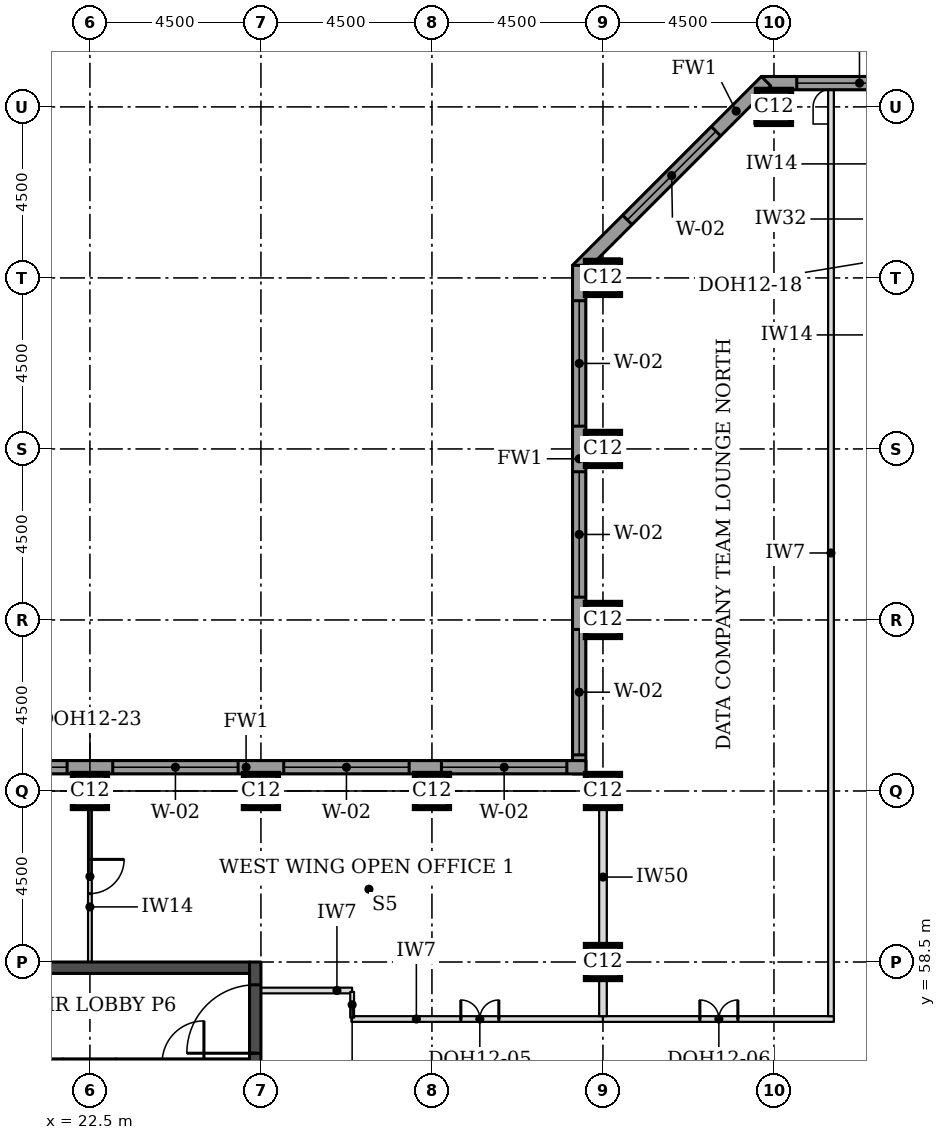
"""IFC4 building model, lengths in metres.
Left out: names, types, materials, properties, quantities, classifications, styles, units other than length and angle.
Written with IfcOpenShell. Run it as: python <this file> out.ifc"""

import sys

from ifc_helpers import new_model, si_unit, direction, frame, frame_2d, origin, origin_2d, place, context, subcontext, project, spatial, rectangle, extrude, element, fill, save


model = new_model("IFC4")
c1 = context("Model", 3, precision=1e-05, world=origin(), true_north=direction((0.0, 1.0)))
c2 = subcontext(c1, "Body", "Model", "MODEL_VIEW")
j1 = project(units=[si_unit("LENGTHUNIT", "METRE"), si_unit("PLANEANGLEUNIT", "RADIAN")], contexts=[c1])
p1 = place(None, origin())
s1 = spatial("IfcSite", under=j1, at=p1, CompositionType="ELEMENT")
p2 = place(p1, origin())
s2 = spatial("IfcBuilding", under=s1, at=p2, CompositionType="ELEMENT")
p3 = place(p2, frame((0.0, 0.0, 248.9)))
s3 = spatial("IfcBuildingStorey", under=s2, at=p3, CompositionType="ELEMENT", Elevation=248.9)
for number, where, z_axis, x_axis in (
    (1, (36.0, 58.5, 0.0), (0.0, 0.0, 1.0), (1.0, 0.0, 0.0)),
    (2, (22.5, 63.0, 0.0), (0.0, 0.0, 1.0), (1.0, 0.0, 0.0)),
    (3, (27.0, 63.0, 0.0), (0.0, 0.0, 1.0), (1.0, 0.0, 0.0)),
    (4, (31.5, 63.0, 0.0), (0.0, 0.0, 1.0), (1.0, 0.0, 0.0)),
    (5, (36.0, 63.0, 0.0), (0.0, 0.0, 1.0), (1.0, 0.0, 0.0)),
    (6, (36.0, 67.5, 0.0), (0.0, 0.0, 1.0), (1.0, 0.0, 0.0)),
    (7, (36.0, 72.0, 0.0), (0.0, 0.0, 1.0), (1.0, 0.0, 0.0)),
    (8, (36.0, 76.5, 0.0), (0.0, 0.0, 1.0), (1.0, 0.0, 0.0)),
    (9, (40.5, 81.0, 0.0), (0.0, 0.0, 1.0), (1.0, 0.0, 0.0)),
):
    element("IfcColumn", number, at=place(p3, frame(where, z_axis=z_axis, x_axis=x_axis)), inside=s3, PredefinedType="COLUMN", context=c2, shape_type="SweptSolid", body=[
        extrude(rectangle(XDim=0.9, YDim=0.9, at=origin_2d()), origin(), (0.0, 0.0, 1.0), 3.7),
    ])
p4 = place(p3, frame((18.3, 58.35, 0.0), z_axis=(0.0, 0.0, 1.0), x_axis=(1.0, 0.0, 0.0)))
e10 = element("IfcWall", 10, at=p4, inside=s3, PredefinedType="SHEAR", context=c2, shape_type="SweptSolid", body=[
    extrude(rectangle(XDim=8.4, YDim=0.3, at=frame_2d((4.2, 0.0))), origin(), (0.0, 0.0, 1.0), 3.7),
])
p5 = place(p3, frame((26.85, 49.5, 0.0), z_axis=(0.0, 0.0, 1.0), x_axis=(0.0, 1.0, 0.0)))
e11 = element("IfcWall", 11, at=p5, inside=s3, PredefinedType="SHEAR", context=c2, shape_type="SweptSolid", body=[
    extrude(rectangle(XDim=9.0, YDim=0.3, at=frame_2d((4.5, 0.0))), origin(), (0.0, 0.0, 1.0), 3.7),
])
p6 = place(p5, frame((6.6, 0.0, 0.0)))
e12 = element("IfcOpeningElement", 12, at=p6, cuts=e11, PredefinedType="OPENING", context=c2, shape_type="SweptSolid", body=[
    extrude(rectangle(XDim=1.8, YDim=2.1, at=frame_2d((0.9, 1.05))), frame((0.0, 0.16, 0.0), z_axis=(0.0, -1.0, 0.0), x_axis=(1.0, 0.0, 0.0)), (0.0, 0.0, 1.0), 0.32),
])
p7 = place(p3, frame((72.331, 81.625, 0.0), z_axis=(0.0, 0.0, 1.0), x_axis=(-1.0, 0.0, 0.0)))
e13 = element("IfcWall", 13, at=p7, inside=s3, PredefinedType="STANDARD", context=c2, shape_type="SweptSolid", body=[
    extrude(rectangle(XDim=32.163, YDim=0.35, at=frame_2d((16.081, 0.0))), origin(), (0.0, 0.0, 1.0), 3.525),
])
p8 = place(p7, frame((0.931, 0.0, 0.9)))
e14 = element("IfcOpeningElement", 14, at=p8, cuts=e13, PredefinedType="OPENING", context=c2, shape_type="SweptSolid", body=[
    extrude(rectangle(XDim=3.3, YDim=1.9, at=frame_2d((1.65, 0.95))), frame((0.0, 0.185, 0.0), z_axis=(0.0, -1.0, 0.0), x_axis=(1.0, 0.0, 0.0)), (0.0, 0.0, 1.0), 0.37),
])
p9 = place(p7, frame((5.431, 0.0, 0.9)))
e15 = element("IfcOpeningElement", 15, at=p9, cuts=e13, PredefinedType="OPENING", context=c2, shape_type="SweptSolid", body=[
    extrude(rectangle(XDim=3.3, YDim=1.9, at=frame_2d((1.65, 0.95))), frame((0.0, 0.185, 0.0), z_axis=(0.0, -1.0, 0.0), x_axis=(1.0, 0.0, 0.0)), (0.0, 0.0, 1.0), 0.37),
])
p10 = place(p7, frame((9.931, 0.0, 0.9)))
e16 = element("IfcOpeningElement", 16, at=p10, cuts=e13, PredefinedType="OPENING", context=c2, shape_type="SweptSolid", body=[
    extrude(rectangle(XDim=3.3, YDim=1.9, at=frame_2d((1.65, 0.95))), frame((0.0, 0.185, 0.0), z_axis=(0.0, -1.0, 0.0), x_axis=(1.0, 0.0, 0.0)), (0.0, 0.0, 1.0), 0.37),
])
p11 = place(p7, frame((14.431, 0.0, 0.9)))
e17 = element("IfcOpeningElement", 17, at=p11, cuts=e13, PredefinedType="OPENING", context=c2, shape_type="SweptSolid", body=[
    extrude(rectangle(XDim=3.3, YDim=1.9, at=frame_2d((1.65, 0.95))), frame((0.0, 0.185, 0.0), z_axis=(0.0, -1.0, 0.0), x_axis=(1.0, 0.0, 0.0)), (0.0, 0.0, 1.0), 0.37),
])
p12 = place(p7, frame((18.931, 0.0, 0.9)))
e18 = element("IfcOpeningElement", 18, at=p12, cuts=e13, PredefinedType="OPENING", context=c2, shape_type="SweptSolid", body=[
    extrude(rectangle(XDim=3.3, YDim=1.9, at=frame_2d((1.65, 0.95))), frame((0.0, 0.185, 0.0), z_axis=(0.0, -1.0, 0.0), x_axis=(1.0, 0.0, 0.0)), (0.0, 0.0, 1.0), 0.37),
])
p13 = place(p7, frame((23.431, 0.0, 0.9)))
e19 = element("IfcOpeningElement", 19, at=p13, cuts=e13, PredefinedType="OPENING", context=c2, shape_type="SweptSolid", body=[
    extrude(rectangle(XDim=3.3, YDim=1.9, at=frame_2d((1.65, 0.95))), frame((0.0, 0.185, 0.0), z_axis=(0.0, -1.0, 0.0), x_axis=(1.0, 0.0, 0.0)), (0.0, 0.0, 1.0), 0.37),
])
p14 = place(p7, frame((27.931, 0.0, 0.9)))
e20 = element("IfcOpeningElement", 20, at=p14, cuts=e13, PredefinedType="OPENING", context=c2, shape_type="SweptSolid", body=[
    extrude(rectangle(XDim=3.3, YDim=1.9, at=frame_2d((1.65, 0.95))), frame((0.0, 0.185, 0.0), z_axis=(0.0, -1.0, 0.0), x_axis=(1.0, 0.0, 0.0)), (0.0, 0.0, 1.0), 0.37),
])
p15 = place(p3, frame((40.292, 81.676, 0.0), z_axis=(0.0, 0.0, 1.0), x_axis=(-0.707106781187, -0.707106781187, 0.0)))
e21 = element("IfcWall", 21, at=p15, inside=s3, PredefinedType="STANDARD", context=c2, shape_type="SweptSolid", body=[
    extrude(rectangle(XDim=7.027, YDim=0.35, at=frame_2d((3.513, 0.0))), origin(), (0.0, 0.0, 1.0), 3.525),
])
p16 = place(p15, frame((1.863, 0.0, 0.9)))
e22 = element("IfcOpeningElement", 22, at=p16, cuts=e21, PredefinedType="OPENING", context=c2, shape_type="SweptSolid", body=[
    extrude(rectangle(XDim=3.3, YDim=1.9, at=frame_2d((1.65, 0.95))), frame((0.0, 0.185, 0.0), z_axis=(0.0, -1.0, 0.0), x_axis=(1.0, 0.0, 0.0)), (0.0, 0.0, 1.0), 0.37),
])
p17 = place(p3, frame((35.375, 76.831, 0.0), z_axis=(0.0, 0.0, 1.0), x_axis=(0.0, -1.0, 0.0)))
e23 = element("IfcWall", 23, at=p17, inside=s3, PredefinedType="STANDARD", context=c2, shape_type="SweptSolid", body=[
    extrude(rectangle(XDim=13.381, YDim=0.35, at=frame_2d((6.691, 0.0))), origin(), (0.0, 0.0, 1.0), 3.525),
])
p18 = place(p17, frame((0.931, 0.0, 0.9)))
e24 = element("IfcOpeningElement", 24, at=p18, cuts=e23, PredefinedType="OPENING", context=c2, shape_type="SweptSolid", body=[
    extrude(rectangle(XDim=3.3, YDim=1.9, at=frame_2d((1.65, 0.95))), frame((0.0, 0.185, 0.0), z_axis=(0.0, -1.0, 0.0), x_axis=(1.0, 0.0, 0.0)), (0.0, 0.0, 1.0), 0.37),
])
p19 = place(p17, frame((5.431, 0.0, 0.9)))
e25 = element("IfcOpeningElement", 25, at=p19, cuts=e23, PredefinedType="OPENING", context=c2, shape_type="SweptSolid", body=[
    extrude(rectangle(XDim=3.3, YDim=1.9, at=frame_2d((1.65, 0.95))), frame((0.0, 0.185, 0.0), z_axis=(0.0, -1.0, 0.0), x_axis=(1.0, 0.0, 0.0)), (0.0, 0.0, 1.0), 0.37),
])
p20 = place(p17, frame((9.581, 0.0, 0.9)))
e26 = element("IfcOpeningElement", 26, at=p20, cuts=e23, PredefinedType="OPENING", context=c2, shape_type="SweptSolid", body=[
    extrude(rectangle(XDim=3.3, YDim=1.9, at=frame_2d((1.65, 0.95))), frame((0.0, 0.185, 0.0), z_axis=(0.0, -1.0, 0.0), x_axis=(1.0, 0.0, 0.0)), (0.0, 0.0, 1.0), 0.37),
])
p21 = place(p3, frame((35.55, 63.625, 0.0), z_axis=(0.0, 0.0, 1.0), x_axis=(-1.0, 0.0, 0.0)))
e27 = element("IfcWall", 27, at=p21, inside=s3, PredefinedType="STANDARD", context=c2, shape_type="SweptSolid", body=[
    extrude(rectangle(XDim=17.881, YDim=0.35, at=frame_2d((8.941, 0.0))), origin(), (0.0, 0.0, 1.0), 3.525),
])
p22 = place(p21, frame((0.5, 0.0, 0.9)))
e28 = element("IfcOpeningElement", 28, at=p22, cuts=e27, PredefinedType="OPENING", context=c2, shape_type="SweptSolid", body=[
    extrude(rectangle(XDim=3.3, YDim=1.9, at=frame_2d((1.65, 0.95))), frame((0.0, 0.185, 0.0), z_axis=(0.0, -1.0, 0.0), x_axis=(1.0, 0.0, 0.0)), (0.0, 0.0, 1.0), 0.37),
])
p23 = place(p21, frame((4.65, 0.0, 0.9)))
e29 = element("IfcOpeningElement", 29, at=p23, cuts=e27, PredefinedType="OPENING", context=c2, shape_type="SweptSolid", body=[
    extrude(rectangle(XDim=3.3, YDim=1.9, at=frame_2d((1.65, 0.95))), frame((0.0, 0.185, 0.0), z_axis=(0.0, -1.0, 0.0), x_axis=(1.0, 0.0, 0.0)), (0.0, 0.0, 1.0), 0.37),
])
p24 = place(p21, frame((9.15, 0.0, 0.9)))
e30 = element("IfcOpeningElement", 30, at=p24, cuts=e27, PredefinedType="OPENING", context=c2, shape_type="SweptSolid", body=[
    extrude(rectangle(XDim=3.3, YDim=1.9, at=frame_2d((1.65, 0.95))), frame((0.0, 0.185, 0.0), z_axis=(0.0, -1.0, 0.0), x_axis=(1.0, 0.0, 0.0)), (0.0, 0.0, 1.0), 0.37),
])
p25 = place(p21, frame((13.65, 0.0, 0.9)))
e31 = element("IfcOpeningElement", 31, at=p25, cuts=e27, PredefinedType="OPENING", context=c2, shape_type="SweptSolid", body=[
    extrude(rectangle(XDim=3.3, YDim=1.9, at=frame_2d((1.65, 0.95))), frame((0.0, 0.185, 0.0), z_axis=(0.0, -1.0, 0.0), x_axis=(1.0, 0.0, 0.0)), (0.0, 0.0, 1.0), 0.37),
])
p26 = place(p3, frame((29.38, 57.0, 0.0), z_axis=(0.0, 0.0, 1.0), x_axis=(1.0, 0.0, 0.0)))
e32 = element("IfcWall", 32, at=p26, inside=s3, PredefinedType="PARTITIONING", context=c2, shape_type="SweptSolid", body=[
    extrude(rectangle(XDim=6.62, YDim=0.15, at=frame_2d((3.31, 0.0))), origin(), (0.0, 0.0, 1.0), 3.55),
])
p27 = place(p26, frame((2.88, 0.0, 0.0)))
e33 = element("IfcOpeningElement", 33, at=p27, cuts=e32, PredefinedType="OPENING", context=c2, shape_type="SweptSolid", body=[
    extrude(rectangle(XDim=1.0, YDim=2.1, at=frame_2d((0.5, 1.05))), frame((0.0, 0.085, 0.0), z_axis=(0.0, -1.0, 0.0), x_axis=(1.0, 0.0, 0.0)), (0.0, 0.0, 1.0), 0.17),
])
p28 = place(p3, frame((36.0, 57.0, 0.0), z_axis=(0.0, 0.0, 1.0), x_axis=(1.0, 0.0, 0.0)))
e34 = element("IfcWall", 34, at=p28, inside=s3, PredefinedType="PARTITIONING", context=c2, shape_type="SweptSolid", body=[
    extrude(rectangle(XDim=6.075, YDim=0.15, at=frame_2d((3.038, 0.0))), origin(), (0.0, 0.0, 1.0), 3.55),
])
p29 = place(p28, frame((2.55, 0.0, 0.0)))
e35 = element("IfcOpeningElement", 35, at=p29, cuts=e34, PredefinedType="OPENING", context=c2, shape_type="SweptSolid", body=[
    extrude(rectangle(XDim=1.0, YDim=2.1, at=frame_2d((0.5, 1.05))), frame((0.0, 0.085, 0.0), z_axis=(0.0, -1.0, 0.0), x_axis=(1.0, 0.0, 0.0)), (0.0, 0.0, 1.0), 0.17),
])
p30 = place(p3, frame((36.0, 57.075, 0.0), z_axis=(0.0, 0.0, 1.0), x_axis=(0.0, 1.0, 0.0)))
e36 = element("IfcWall", 36, at=p30, inside=s3, PredefinedType="PARTITIONING", context=c2, shape_type="SweptSolid", body=[
    extrude(rectangle(XDim=0.975, YDim=0.2, at=frame_2d((0.488, 0.0))), origin(), (0.0, 0.0, 1.0), 2.8),
])
p31 = place(p3, frame((42.0, 57.075, 0.0), z_axis=(0.0, 0.0, 1.0), x_axis=(0.0, 1.0, 0.0)))
e37 = element("IfcWall", 37, at=p31, inside=s3, PredefinedType="PARTITIONING", context=c2, shape_type="SweptSolid", body=[
    extrude(rectangle(XDim=24.375, YDim=0.15, at=frame_2d((12.188, 0.0))), origin(), (0.0, 0.0, 1.0), 3.55),
])
p32 = place(p3, frame((36.0, 58.92, 0.0), z_axis=(0.0, 0.0, 1.0), x_axis=(0.0, 1.0, 0.0)))
e38 = element("IfcWall", 38, at=p32, inside=s3, PredefinedType="PARTITIONING", context=c2, shape_type="SweptSolid", body=[
    extrude(rectangle(XDim=3.63, YDim=0.2, at=frame_2d((1.815, 0.0))), origin(), (0.0, 0.0, 1.0), 2.8),
])
p33 = place(p3, frame((22.5, 63.0, 0.0), z_axis=(0.0, 0.0, 1.0), x_axis=(0.0, -1.0, 0.0)))
e39 = element("IfcWall", 39, at=p33, inside=s3, PredefinedType="PARTITIONING", context=c2, shape_type="SweptSolid", body=[
    extrude(rectangle(XDim=4.5, YDim=0.1, at=frame_2d((2.25, 0.0))), origin(), (0.0, 0.0, 1.0), 3.55),
])
p34 = place(p33, frame((1.8, 0.0, 0.0)))
e40 = element("IfcOpeningElement", 40, at=p34, cuts=e39, PredefinedType="OPENING", context=c2, shape_type="SweptSolid", body=[
    extrude(rectangle(XDim=0.9, YDim=2.1, at=frame_2d((0.45, 1.05))), frame((0.0, 0.06, 0.0), z_axis=(0.0, -1.0, 0.0), x_axis=(1.0, 0.0, 0.0)), (0.0, 0.0, 1.0), 0.12),
])
p35 = place(p3, frame((27.0, 57.75, 0.0), z_axis=(0.0, 0.0, 1.0), x_axis=(1.0, 0.0, 0.0)))
e41 = element("IfcWall", 41, at=p35, inside=s3, PredefinedType="PARTITIONING", context=c2, shape_type="SweptSolid", body=[
    extrude(rectangle(XDim=2.4, YDim=0.15, at=frame_2d((1.2, 0.0))), origin(), (0.0, 0.0, 1.0), 3.55),
])
p36 = place(p3, frame((29.4, 57.715, 0.0), z_axis=(0.0, 0.0, 1.0), x_axis=(0.0, -1.0, 0.0)))
e42 = element("IfcWall", 42, at=p36, inside=s3, PredefinedType="PARTITIONING", context=c2, shape_type="SweptSolid", body=[
    extrude(rectangle(XDim=0.68, YDim=0.1, at=frame_2d((0.34, 0.0))), origin(), (0.0, 0.0, 1.0), 3.55),
])
p37 = place(p3, frame((21.8, 55.85, 0.0), z_axis=(0.0, 0.0, 1.0), x_axis=(1.0, 0.0, 0.0)))
e43 = element("IfcWall", 43, at=p37, inside=s3, PredefinedType="SOLIDWALL", context=c2, shape_type="SweptSolid", body=[
    extrude(rectangle(XDim=1.4, YDim=0.2, at=frame_2d((0.7, 0.0))), origin(), (0.0, 0.0, 1.0), 3.55),
])
p38 = place(p3, frame((18.3, 55.85, 0.0), z_axis=(0.0, 0.0, 1.0), x_axis=(1.0, 0.0, 0.0)))
e44 = element("IfcWall", 44, at=p38, inside=s3, PredefinedType="SOLIDWALL", context=c2, shape_type="SweptSolid", body=[
    extrude(rectangle(XDim=3.5, YDim=0.2, at=frame_2d((1.75, 0.0))), origin(), (0.0, 0.0, 1.0), 3.55),
])
p39 = place(p38, frame((1.2, 0.0, 0.0)))
e45 = element("IfcOpeningElement", 45, at=p39, cuts=e44, PredefinedType="OPENING", context=c2, shape_type="SweptSolid", body=[
    extrude(rectangle(XDim=1.1, YDim=2.1, at=frame_2d((0.55, 1.05))), frame((0.0, 0.11, 0.0), z_axis=(0.0, -1.0, 0.0), x_axis=(1.0, 0.0, 0.0)), (0.0, 0.0, 1.0), 0.22),
])
p40 = place(p3, frame((23.2, 55.85, 0.0), z_axis=(0.0, 0.0, 1.0), x_axis=(1.0, 0.0, 0.0)))
e46 = element("IfcWall", 46, at=p40, inside=s3, PredefinedType="SOLIDWALL", context=c2, shape_type="SweptSolid", body=[
    extrude(rectangle(XDim=3.5, YDim=0.2, at=frame_2d((1.75, 0.0))), origin(), (0.0, 0.0, 1.0), 3.55),
])
p41 = place(p40, frame((1.2, 0.0, 0.0)))
e47 = element("IfcOpeningElement", 47, at=p41, cuts=e46, PredefinedType="OPENING", context=c2, shape_type="SweptSolid", body=[
    extrude(rectangle(XDim=1.1, YDim=2.1, at=frame_2d((0.55, 1.05))), frame((0.0, 0.11, 0.0), z_axis=(0.0, -1.0, 0.0), x_axis=(1.0, 0.0, 0.0)), (0.0, 0.0, 1.0), 0.22),
])
p42 = place(p14, origin())
e48 = element("IfcWindow", 48, at=p42, inside=s3, PartitioningType="SINGLE_PANEL", PredefinedType="WINDOW", context=c2, shape_type="SweptSolid", body=[
    extrude(rectangle(XDim=3.3, YDim=1.9, at=frame_2d((1.65, 0.95))), frame((0.0, 0.085, 0.0), z_axis=(0.0, -1.0, 0.0), x_axis=(1.0, 0.0, 0.0)), (0.0, 0.0, 1.0), 0.06),
])
fill(e20, e48)
p43 = place(p16, origin())
e49 = element("IfcWindow", 49, at=p43, inside=s3, PartitioningType="SINGLE_PANEL", PredefinedType="WINDOW", context=c2, shape_type="SweptSolid", body=[
    extrude(rectangle(XDim=3.3, YDim=1.9, at=frame_2d((1.65, 0.95))), frame((0.0, 0.085, 0.0), z_axis=(0.0, -1.0, 0.0), x_axis=(1.0, 0.0, 0.0)), (0.0, 0.0, 1.0), 0.06),
])
fill(e22, e49)
p44 = place(p18, origin())
e50 = element("IfcWindow", 50, at=p44, inside=s3, PartitioningType="SINGLE_PANEL", PredefinedType="WINDOW", context=c2, shape_type="SweptSolid", body=[
    extrude(rectangle(XDim=3.3, YDim=1.9, at=frame_2d((1.65, 0.95))), frame((0.0, 0.085, 0.0), z_axis=(0.0, -1.0, 0.0), x_axis=(1.0, 0.0, 0.0)), (0.0, 0.0, 1.0), 0.06),
])
fill(e24, e50)
p45 = place(p19, origin())
e51 = element("IfcWindow", 51, at=p45, inside=s3, PartitioningType="SINGLE_PANEL", PredefinedType="WINDOW", context=c2, shape_type="SweptSolid", body=[
    extrude(rectangle(XDim=3.3, YDim=1.9, at=frame_2d((1.65, 0.95))), frame((0.0, 0.085, 0.0), z_axis=(0.0, -1.0, 0.0), x_axis=(1.0, 0.0, 0.0)), (0.0, 0.0, 1.0), 0.06),
])
fill(e25, e51)
p46 = place(p20, origin())
e52 = element("IfcWindow", 52, at=p46, inside=s3, PartitioningType="SINGLE_PANEL", PredefinedType="WINDOW", context=c2, shape_type="SweptSolid", body=[
    extrude(rectangle(XDim=3.3, YDim=1.9, at=frame_2d((1.65, 0.95))), frame((0.0, 0.085, 0.0), z_axis=(0.0, -1.0, 0.0), x_axis=(1.0, 0.0, 0.0)), (0.0, 0.0, 1.0), 0.06),
])
fill(e26, e52)
p47 = place(p22, origin())
e53 = element("IfcWindow", 53, at=p47, inside=s3, PartitioningType="SINGLE_PANEL", PredefinedType="WINDOW", context=c2, shape_type="SweptSolid", body=[
    extrude(rectangle(XDim=3.3, YDim=1.9, at=frame_2d((1.65, 0.95))), frame((0.0, 0.085, 0.0), z_axis=(0.0, -1.0, 0.0), x_axis=(1.0, 0.0, 0.0)), (0.0, 0.0, 1.0), 0.06),
])
fill(e28, e53)
p48 = place(p23, origin())
e54 = element("IfcWindow", 54, at=p48, inside=s3, PartitioningType="SINGLE_PANEL", PredefinedType="WINDOW", context=c2, shape_type="SweptSolid", body=[
    extrude(rectangle(XDim=3.3, YDim=1.9, at=frame_2d((1.65, 0.95))), frame((0.0, 0.085, 0.0), z_axis=(0.0, -1.0, 0.0), x_axis=(1.0, 0.0, 0.0)), (0.0, 0.0, 1.0), 0.06),
])
fill(e29, e54)
p49 = place(p24, origin())
e55 = element("IfcWindow", 55, at=p49, inside=s3, PartitioningType="SINGLE_PANEL", PredefinedType="WINDOW", context=c2, shape_type="SweptSolid", body=[
    extrude(rectangle(XDim=3.3, YDim=1.9, at=frame_2d((1.65, 0.95))), frame((0.0, 0.085, 0.0), z_axis=(0.0, -1.0, 0.0), x_axis=(1.0, 0.0, 0.0)), (0.0, 0.0, 1.0), 0.06),
])
fill(e30, e55)
p50 = place(p25, origin())
e56 = element("IfcWindow", 56, at=p50, inside=s3, PartitioningType="SINGLE_PANEL", PredefinedType="WINDOW", context=c2, shape_type="SweptSolid", body=[
    extrude(rectangle(XDim=3.3, YDim=1.9, at=frame_2d((1.65, 0.95))), frame((0.0, 0.085, 0.0), z_axis=(0.0, -1.0, 0.0), x_axis=(1.0, 0.0, 0.0)), (0.0, 0.0, 1.0), 0.06),
])
fill(e31, e56)
p51 = place(p29, origin())
e57 = element("IfcDoor", 57, at=p51, inside=s3, OperationType="DOUBLE_DOOR_SINGLE_SWING", PredefinedType="DOOR", context=c2, shape_type="SweptSolid", body=[
    extrude(rectangle(XDim=1.0, YDim=2.1, at=frame_2d((0.5, 1.05))), frame((0.0, 0.025, 0.0), z_axis=(0.0, -1.0, 0.0), x_axis=(1.0, 0.0, 0.0)), (0.0, 0.0, 1.0), 0.05),
])
fill(e35, e57)
p52 = place(p27, origin())
e58 = element("IfcDoor", 58, at=p52, inside=s3, OperationType="DOUBLE_DOOR_SINGLE_SWING", PredefinedType="DOOR", context=c2, shape_type="SweptSolid", body=[
    extrude(rectangle(XDim=1.0, YDim=2.1, at=frame_2d((0.5, 1.05))), frame((0.0, 0.025, 0.0), z_axis=(0.0, -1.0, 0.0), x_axis=(1.0, 0.0, 0.0)), (0.0, 0.0, 1.0), 0.05),
])
fill(e33, e58)
p53 = place(p34, origin())
e59 = element("IfcDoor", 59, at=p53, inside=s3, OperationType="SINGLE_SWING_LEFT", PredefinedType="DOOR", context=c2, shape_type="SweptSolid", body=[
    extrude(rectangle(XDim=0.9, YDim=2.1, at=frame_2d((0.45, 1.05))), frame((0.0, 0.025, 0.0), z_axis=(0.0, -1.0, 0.0), x_axis=(1.0, 0.0, 0.0)), (0.0, 0.0, 1.0), 0.05),
])
fill(e40, e59)
p54 = place(p6, origin())
e60 = element("IfcDoor", 60, at=p54, inside=s3, OperationType="SINGLE_SWING_LEFT", PredefinedType="DOOR", context=c2, shape_type="SweptSolid", body=[
    extrude(rectangle(XDim=1.8, YDim=2.1, at=frame_2d((0.9, 1.05))), frame((0.0, 0.025, 0.0), z_axis=(0.0, -1.0, 0.0), x_axis=(1.0, 0.0, 0.0)), (0.0, 0.0, 1.0), 0.05),
])
fill(e12, e60)
save(model, sys.argv[1])
